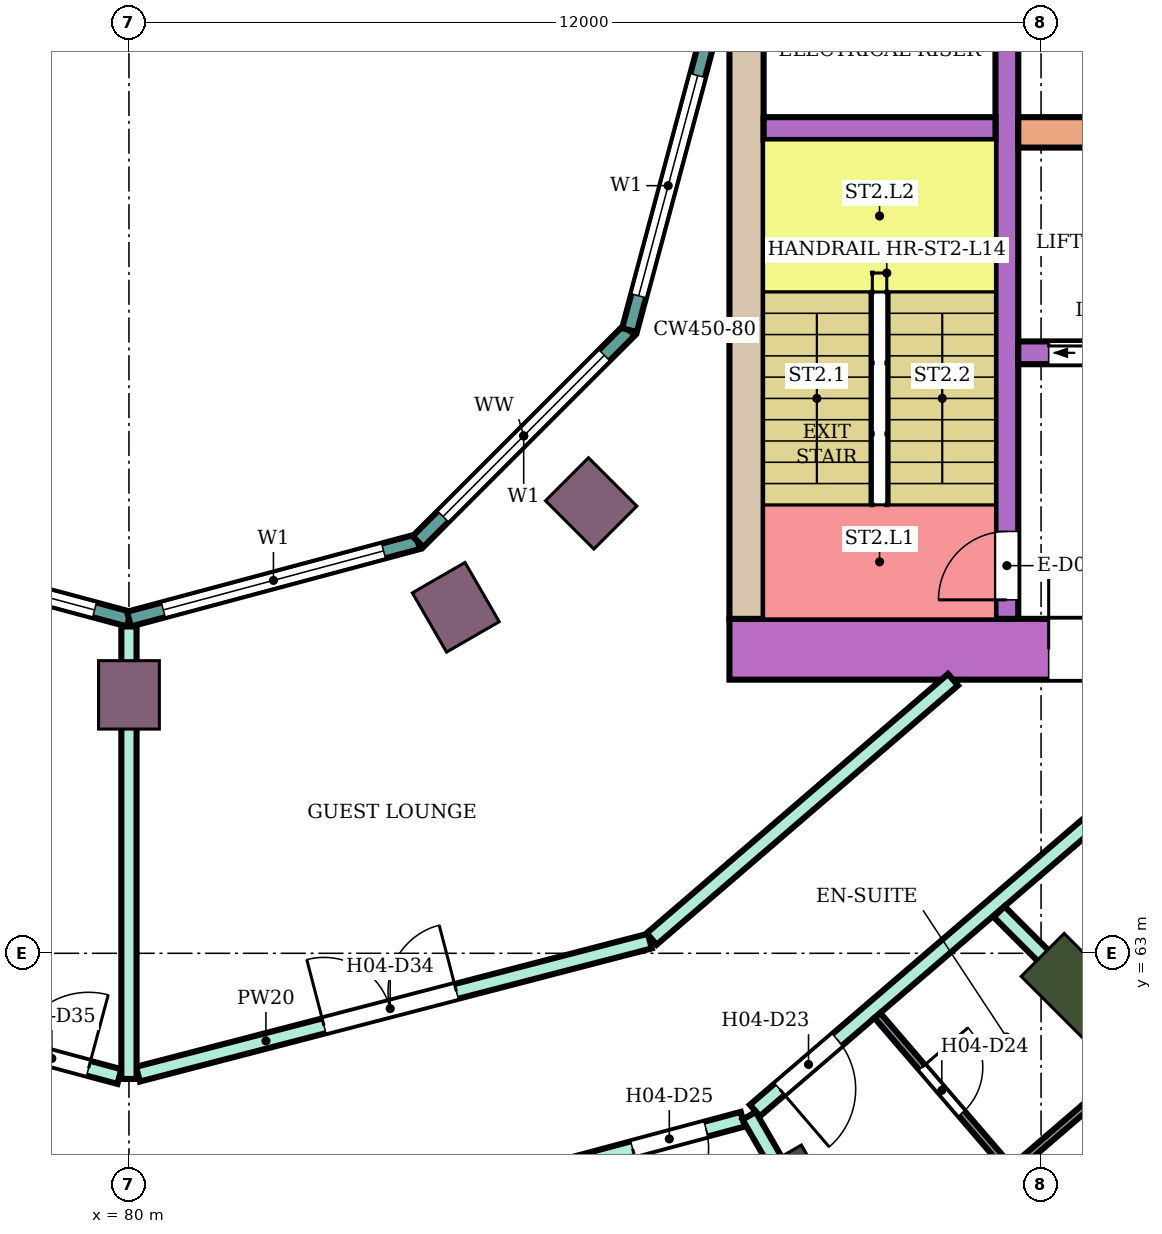
"""IFC4 building model, lengths in metres.
Left out: names, types, materials, properties, quantities, classifications, styles, units other than length and angle.
Written with IfcOpenShell. Run it as: python <this file> out.ifc"""

import sys

from ifc_helpers import new_model, si_unit, direction, frame, frame_2d, origin, origin_2d, place, context, subcontext, project, spatial, rectangle, extrude, element, fill, save


model = new_model("IFC4")
c1 = context("Model", 3, precision=1e-05, world=origin(), true_north=direction((0.0, 1.0)))
c2 = subcontext(c1, "Body", "Model", "MODEL_VIEW")
j1 = project(units=[si_unit("LENGTHUNIT", "METRE"), si_unit("PLANEANGLEUNIT", "RADIAN")], contexts=[c1])
p1 = place(None, origin())
s1 = spatial("IfcSite", under=j1, at=p1, CompositionType="ELEMENT")
p2 = place(p1, origin())
s2 = spatial("IfcBuilding", under=s1, at=p2, CompositionType="ELEMENT")
p3 = place(p2, frame((0.0, 0.0, 63.0)))
s3 = spatial("IfcBuildingStorey", under=s2, at=p3, CompositionType="ELEMENT", Elevation=63.0)
for number, where, z_axis, x_axis in (
    (1, (88.8, 59.758, 0.0), (0.0, 0.0, 1.0), (0.5, -0.866, 0.0)),
    (2, (92.445, 62.555, 0.0), (0.0, 0.0, 1.0), (0.707, -0.707, 0.0)),
):
    element("IfcColumn", number, at=place(p3, frame(where, z_axis=z_axis, x_axis=x_axis)), inside=s3, PredefinedType="COLUMN", context=c2, shape_type="SweptSolid", body=[
        extrude(rectangle(XDim=1.2, YDim=0.8, at=origin_2d()), origin(), (0.0, 0.0, 1.0), 3.8),
    ])
for number, where, z_axis, x_axis in (
    (3, (80.0, 66.4, 0.0), (0.0, 0.0, 1.0), (0.0, -1.0, 0.0)),
    (4, (84.3, 67.552, 0.0), (0.0, 0.0, 1.0), (0.5, -0.866, 0.0)),
    (5, (86.081, 68.919, 0.0), (0.0, 0.0, 1.0), (0.707, -0.707, 0.0)),
):
    element("IfcColumn", number, at=place(p3, frame(where, z_axis=z_axis, x_axis=x_axis)), inside=s3, PredefinedType="COLUMN", context=c2, shape_type="SweptSolid", body=[
        extrude(rectangle(XDim=0.9, YDim=0.8, at=origin_2d()), origin(), (0.0, 0.0, 1.0), 3.8),
    ])
p4 = place(p3, frame((87.9, 67.0, 0.0), z_axis=(0.0, 0.0, 1.0), x_axis=(1.0, 0.0, 0.0)))
e6 = element("IfcWall", 6, at=p4, inside=s3, PredefinedType="SHEAR", context=c2, shape_type="SweptSolid", body=[
    extrude(rectangle(XDim=14.7, YDim=0.8, at=frame_2d((7.35, 0.0))), origin(), (0.0, 0.0, 1.0), 3.48),
])
p5 = place(p4, frame((4.2, 0.0, 0.0)))
e7 = element("IfcOpeningElement", 7, at=p5, cuts=e6, PredefinedType="OPENING", context=c2, shape_type="SweptSolid", body=[
    extrude(rectangle(XDim=2.4, YDim=2.4, at=frame_2d((1.2, 1.2))), frame((0.0, 0.41, 0.0), z_axis=(0.0, -1.0, 0.0), x_axis=(1.0, 0.0, 0.0)), (0.0, 0.0, 1.0), 0.82),
])
p6 = place(p3, frame((88.125, 67.4, 0.0), z_axis=(0.0, 0.0, 1.0), x_axis=(0.0, 1.0, 0.0)))
e8 = element("IfcWall", 8, at=p6, inside=s3, PredefinedType="SHEAR", context=c2, shape_type="SweptSolid", body=[
    extrude(rectangle(XDim=7.6, YDim=0.45, at=frame_2d((3.8, 0.0))), origin(), (0.0, 0.0, 1.0), 3.48),
])
p7 = place(p3, frame((91.55, 67.4, 0.0), z_axis=(0.0, 0.0, 1.0), x_axis=(0.0, 1.0, 0.0)))
e9 = element("IfcWall", 9, at=p7, inside=s3, PredefinedType="SHEAR", context=c2, shape_type="SweptSolid", body=[
    extrude(rectangle(XDim=7.6, YDim=0.3, at=frame_2d((3.8, 0.0))), origin(), (0.0, 0.0, 1.0), 3.48),
])
p8 = place(p7, frame((0.25, 0.0, 0.0)))
e10 = element("IfcOpeningElement", 10, at=p8, cuts=e9, PredefinedType="OPENING", context=c2, shape_type="SweptSolid", body=[
    extrude(rectangle(XDim=0.9, YDim=2.1, at=frame_2d((0.45, 1.05))), frame((0.0, 0.16, 0.0), z_axis=(0.0, -1.0, 0.0), x_axis=(1.0, 0.0, 0.0)), (0.0, 0.0, 1.0), 0.32),
])
p9 = place(p3, frame((88.35, 73.85, 0.0), z_axis=(0.0, 0.0, 1.0), x_axis=(1.0, 0.0, 0.0)))
e11 = element("IfcWall", 11, at=p9, inside=s3, PredefinedType="SHEAR", context=c2, shape_type="SweptSolid", body=[
    extrude(rectangle(XDim=3.05, YDim=0.3, at=frame_2d((1.525, 0.0))), origin(), (0.0, 0.0, 1.0), 3.48),
])
p10 = place(p3, frame((91.7, 73.8, 0.0), z_axis=(0.0, 0.0, 1.0), x_axis=(1.0, 0.0, 0.0)))
e12 = element("IfcWall", 12, at=p10, inside=s3, PredefinedType="SHEAR", context=c2, shape_type="SweptSolid", body=[
    extrude(rectangle(XDim=10.9, YDim=0.4, at=frame_2d((5.45, 0.0))), origin(), (0.0, 0.0, 1.0), 3.48),
])
p11 = place(p3, frame((91.7, 70.9, 0.0), z_axis=(0.0, 0.0, 1.0), x_axis=(1.0, 0.0, 0.0)))
e13 = element("IfcWall", 13, at=p11, inside=s3, PredefinedType="SHEAR", context=c2, shape_type="SweptSolid", body=[
    extrude(rectangle(XDim=10.9, YDim=0.3, at=frame_2d((5.45, 0.0))), origin(), (0.0, 0.0, 1.0), 3.48),
])
p12 = place(p11, frame((0.4, 0.0, 0.0)))
e14 = element("IfcOpeningElement", 14, at=p12, cuts=e13, PredefinedType="OPENING", context=c2, shape_type="SweptSolid", body=[
    extrude(rectangle(XDim=1.4, YDim=2.1, at=frame_2d((0.7, 1.05))), frame((0.0, 0.16, 0.0), z_axis=(0.0, -1.0, 0.0), x_axis=(1.0, 0.0, 0.0)), (0.0, 0.0, 1.0), 0.32),
])
p13 = place(p11, frame((5.4, 0.0, 0.0)))
e15 = element("IfcOpeningElement", 15, at=p13, cuts=e13, PredefinedType="OPENING", context=c2, shape_type="SweptSolid", body=[
    extrude(rectangle(XDim=1.4, YDim=2.1, at=frame_2d((0.7, 1.05))), frame((0.0, 0.16, 0.0), z_axis=(0.0, -1.0, 0.0), x_axis=(1.0, 0.0, 0.0)), (0.0, 0.0, 1.0), 0.32),
])
p14 = place(p11, frame((8.1, 0.0, 0.0)))
e16 = element("IfcOpeningElement", 16, at=p14, cuts=e13, PredefinedType="OPENING", context=c2, shape_type="SweptSolid", body=[
    extrude(rectangle(XDim=1.0, YDim=2.1, at=frame_2d((0.5, 1.05))), frame((0.0, 0.16, 0.0), z_axis=(0.0, -1.0, 0.0), x_axis=(1.0, 0.0, 0.0)), (0.0, 0.0, 1.0), 0.32),
])
p15 = place(p3, frame((76.198, 68.415, 0.0), z_axis=(0.0, 0.0, 1.0), x_axis=(0.965933654434, -0.258789828301, 0.0)))
e17 = element("IfcWall", 17, at=p15, inside=s3, PredefinedType="NOTDEFINED", context=c2, shape_type="SweptSolid", body=[
    extrude(rectangle(XDim=3.936, YDim=0.2, at=frame_2d((1.968, 0.0))), origin(), (0.0, 0.0, 1.0), 3.8),
])
p16 = place(p15, frame((0.468, 0.0, 0.9)))
e18 = element("IfcOpeningElement", 18, at=p16, cuts=e17, PredefinedType="OPENING", context=c2, shape_type="SweptSolid", body=[
    extrude(rectangle(XDim=3.0, YDim=2.3, at=frame_2d((1.5, 1.15))), frame((0.0, 0.11, 0.0), z_axis=(0.0, -1.0, 0.0), x_axis=(1.0, 0.0, 0.0)), (0.0, 0.0, 1.0), 0.22),
])
p17 = place(p3, frame((80.0, 67.396, 0.0), z_axis=(0.0, 0.0, 1.0), x_axis=(0.965933654434, 0.258789828301, 0.0)))
e19 = element("IfcWall", 19, at=p17, inside=s3, PredefinedType="NOTDEFINED", context=c2, shape_type="SweptSolid", body=[
    extrude(rectangle(XDim=3.936, YDim=0.2, at=frame_2d((1.968, 0.0))), origin(), (0.0, 0.0, 1.0), 3.8),
])
p18 = place(p17, frame((0.468, 0.0, 0.9)))
e20 = element("IfcOpeningElement", 20, at=p18, cuts=e19, PredefinedType="OPENING", context=c2, shape_type="SweptSolid", body=[
    extrude(rectangle(XDim=3.0, YDim=2.3, at=frame_2d((1.5, 1.15))), frame((0.0, 0.11, 0.0), z_axis=(0.0, -1.0, 0.0), x_axis=(1.0, 0.0, 0.0)), (0.0, 0.0, 1.0), 0.22),
])
p19 = place(p3, frame((83.802, 68.415, 0.0), z_axis=(0.0, 0.0, 1.0), x_axis=(0.707106781187, 0.707106781187, 0.0)))
e21 = element("IfcWall", 21, at=p19, inside=s3, PredefinedType="NOTDEFINED", context=c2, shape_type="SweptSolid", body=[
    extrude(rectangle(XDim=3.936, YDim=0.2, at=frame_2d((1.968, 0.0))), origin(), (0.0, 0.0, 1.0), 3.8),
])
p20 = place(p19, frame((0.468, 0.0, 0.9)))
e22 = element("IfcOpeningElement", 22, at=p20, cuts=e21, PredefinedType="OPENING", context=c2, shape_type="SweptSolid", body=[
    extrude(rectangle(XDim=3.0, YDim=2.3, at=frame_2d((1.5, 1.15))), frame((0.0, 0.11, 0.0), z_axis=(0.0, -1.0, 0.0), x_axis=(1.0, 0.0, 0.0)), (0.0, 0.0, 1.0), 0.22),
])
p21 = place(p3, frame((86.585, 71.198, 0.0), z_axis=(0.0, 0.0, 1.0), x_axis=(0.258789828301, 0.965933654434, 0.0)))
e23 = element("IfcWall", 23, at=p21, inside=s3, PredefinedType="NOTDEFINED", context=c2, shape_type="SweptSolid", body=[
    extrude(rectangle(XDim=3.936, YDim=0.2, at=frame_2d((1.968, 0.0))), origin(), (0.0, 0.0, 1.0), 3.8),
])
p22 = place(p21, frame((0.468, 0.0, 0.9)))
e24 = element("IfcOpeningElement", 24, at=p22, cuts=e23, PredefinedType="OPENING", context=c2, shape_type="SweptSolid", body=[
    extrude(rectangle(XDim=3.0, YDim=2.3, at=frame_2d((1.5, 1.15))), frame((0.0, 0.11, 0.0), z_axis=(0.0, -1.0, 0.0), x_axis=(1.0, 0.0, 0.0)), (0.0, 0.0, 1.0), 0.22),
])
p23 = place(p3, frame((71.877, 60.832, 0.0), z_axis=(0.0, 0.0, 1.0), x_axis=(0.965852509869, -0.259092510851, 0.0)))
e25 = element("IfcWall", 25, at=p23, inside=s3, PredefinedType="PARTITIONING", context=c2, shape_type="SweptSolid", body=[
    extrude(rectangle(XDim=8.32, YDim=0.2, at=frame_2d((4.16, 0.0))), origin(), (0.0, 0.0, 1.0), 3.35),
])
p24 = place(p23, frame((6.86, 0.0, 0.0)))
e26 = element("IfcOpeningElement", 26, at=p24, cuts=e25, PredefinedType="OPENING", context=c2, shape_type="SweptSolid", body=[
    extrude(rectangle(XDim=1.0, YDim=2.1, at=frame_2d((0.5, 1.05))), frame((0.0, 0.11, 0.0), z_axis=(0.0, -1.0, 0.0), x_axis=(1.0, 0.0, 0.0)), (0.0, 0.0, 1.0), 0.22),
])
p25 = place(p23, frame((0.55, 0.0, 0.0)))
e27 = element("IfcOpeningElement", 27, at=p25, cuts=e25, PredefinedType="OPENING", context=c2, shape_type="SweptSolid", body=[
    extrude(rectangle(XDim=1.0, YDim=2.1, at=frame_2d((0.5, 1.05))), frame((0.0, 0.11, 0.0), z_axis=(0.0, -1.0, 0.0), x_axis=(1.0, 0.0, 0.0)), (0.0, 0.0, 1.0), 0.22),
])
p26 = place(p3, frame((73.297, 63.143, 0.0), z_axis=(0.0, 0.0, 1.0), x_axis=(0.965859030528, -0.25906820173, 0.0)))
e28 = element("IfcWall", 28, at=p26, inside=s3, PredefinedType="PARTITIONING", context=c2, shape_type="SweptSolid", body=[
    extrude(rectangle(XDim=6.81, YDim=0.2, at=frame_2d((3.405, 0.0))), origin(), (0.0, 0.0, 1.0), 3.35),
])
p27 = place(p26, frame((5.39, 0.0, 0.0)))
e29 = element("IfcOpeningElement", 29, at=p27, cuts=e28, PredefinedType="OPENING", context=c2, shape_type="SweptSolid", body=[
    extrude(rectangle(XDim=1.0, YDim=2.1, at=frame_2d((0.5, 1.05))), frame((0.0, 0.11, 0.0), z_axis=(0.0, -1.0, 0.0), x_axis=(1.0, 0.0, 0.0)), (0.0, 0.0, 1.0), 0.22),
])
p28 = place(p3, frame((80.119, 61.41, 0.0), z_axis=(0.0, 0.0, 1.0), x_axis=(0.967823361235, 0.251630565408, 0.0)))
e30 = element("IfcWall", 30, at=p28, inside=s3, PredefinedType="PARTITIONING", context=c2, shape_type="SweptSolid", body=[
    extrude(rectangle(XDim=6.958, YDim=0.2, at=frame_2d((3.479, 0.0))), origin(), (0.0, 0.0, 1.0), 3.35),
])
p29 = place(p28, frame((2.529, 0.0, 0.0)))
e31 = element("IfcOpeningElement", 31, at=p29, cuts=e30, PredefinedType="OPENING", context=c2, shape_type="SweptSolid", body=[
    extrude(rectangle(XDim=1.8, YDim=2.1, at=frame_2d((0.9, 1.05))), frame((0.0, 0.11, 0.0), z_axis=(0.0, -1.0, 0.0), x_axis=(1.0, 0.0, 0.0)), (0.0, 0.0, 1.0), 0.22),
])
p30 = place(p3, frame((80.0, 58.655, 0.0), z_axis=(0.0, 0.0, 1.0), x_axis=(0.965974635626, 0.258636817424, 0.0)))
e32 = element("IfcWall", 32, at=p30, inside=s3, PredefinedType="PARTITIONING", context=c2, shape_type="SweptSolid", body=[
    extrude(rectangle(XDim=8.36, YDim=0.2, at=frame_2d((4.18, 0.0))), origin(), (0.0, 0.0, 1.0), 3.35),
])
p31 = place(p30, frame((6.86, 0.0, 0.0)))
e33 = element("IfcOpeningElement", 33, at=p31, cuts=e32, PredefinedType="OPENING", context=c2, shape_type="SweptSolid", body=[
    extrude(rectangle(XDim=1.0, YDim=2.1, at=frame_2d((0.5, 1.05))), frame((0.0, 0.11, 0.0), z_axis=(0.0, -1.0, 0.0), x_axis=(1.0, 0.0, 0.0)), (0.0, 0.0, 1.0), 0.22),
])
p32 = place(p30, frame((0.55, 0.0, 0.0)))
e34 = element("IfcOpeningElement", 34, at=p32, cuts=e32, PredefinedType="OPENING", context=c2, shape_type="SweptSolid", body=[
    extrude(rectangle(XDim=1.0, YDim=2.1, at=frame_2d((0.5, 1.05))), frame((0.0, 0.11, 0.0), z_axis=(0.0, -1.0, 0.0), x_axis=(1.0, 0.0, 0.0)), (0.0, 0.0, 1.0), 0.22),
])
p33 = place(p3, frame((80.0, 61.347, 0.0), z_axis=(0.0, 0.0, 1.0), x_axis=(0.0, 1.0, 0.0)))
e35 = element("IfcWall", 35, at=p33, inside=s3, PredefinedType="PARTITIONING", context=c2, shape_type="SweptSolid", body=[
    extrude(rectangle(XDim=5.953, YDim=0.2, at=frame_2d((2.977, 0.0))), origin(), (0.0, 0.0, 1.0), 3.35),
])
p34 = place(p3, frame((86.877, 63.189, 0.0), z_axis=(0.0, 0.0, 1.0), x_axis=(0.758088707506, 0.652151448325, 0.0)))
e36 = element("IfcWall", 36, at=p34, inside=s3, PredefinedType="PARTITIONING", context=c2, shape_type="SweptSolid", body=[
    extrude(rectangle(XDim=5.229, YDim=0.2, at=frame_2d((2.615, 0.0))), origin(), (0.0, 0.0, 1.0), 3.35),
])
p35 = place(p3, frame((88.235, 60.931, 0.0), z_axis=(0.0, 0.0, 1.0), x_axis=(0.758799498714, 0.651324282329, 0.0)))
e37 = element("IfcWall", 37, at=p35, inside=s3, PredefinedType="PARTITIONING", context=c2, shape_type="SweptSolid", body=[
    extrude(rectangle(XDim=6.186, YDim=0.2, at=frame_2d((3.093, 0.0))), origin(), (0.0, 0.0, 1.0), 3.35),
])
p36 = place(p35, frame((0.43, 0.0, 0.0)))
e38 = element("IfcOpeningElement", 38, at=p36, cuts=e37, PredefinedType="OPENING", context=c2, shape_type="SweptSolid", body=[
    extrude(rectangle(XDim=1.0, YDim=2.1, at=frame_2d((0.5, 1.05))), frame((0.0, 0.11, 0.0), z_axis=(0.0, -1.0, 0.0), x_axis=(1.0, 0.0, 0.0)), (0.0, 0.0, 1.0), 0.22),
])
p37 = place(p3, frame((88.159, 60.863, 0.0), z_axis=(0.0, 0.0, 1.0), x_axis=(0.499935840196, -0.866062443296, 0.0)))
e39 = element("IfcWall", 39, at=p37, inside=s3, PredefinedType="PARTITIONING", context=c2, shape_type="SweptSolid", body=[
    extrude(rectangle(XDim=9.475, YDim=0.2, at=frame_2d((4.737, 0.0))), origin(), (0.0, 0.0, 1.0), 3.35),
])
p38 = place(p3, frame((91.448, 63.547, 0.0), z_axis=(0.0, 0.0, 1.0), x_axis=(0.706984810649, -0.707228730688, 0.0)))
e40 = element("IfcWall", 40, at=p38, inside=s3, PredefinedType="PARTITIONING", context=c2, shape_type="SweptSolid", body=[
    extrude(rectangle(XDim=7.006, YDim=0.2, at=frame_2d((3.503, 0.0))), origin(), (0.0, 0.0, 1.0), 3.35),
])
p39 = place(p3, frame((89.846, 62.182, 0.0), z_axis=(0.0, 0.0, 1.0), x_axis=(0.652095405055, -0.758136915541, 0.0)))
e41 = element("IfcWall", 41, at=p39, inside=s3, PredefinedType="PARTITIONING", context=c2, shape_type="SweptSolid", body=[
    extrude(rectangle(XDim=2.65, YDim=0.1, at=frame_2d((1.325, 0.0))), origin(), (0.0, 0.0, 1.0), 3.35),
])
p40 = place(p39, frame((0.9, 0.0, 0.0)))
e42 = element("IfcOpeningElement", 42, at=p40, cuts=e41, PredefinedType="OPENING", context=c2, shape_type="SweptSolid", body=[
    extrude(rectangle(XDim=0.8, YDim=2.1, at=frame_2d((0.4, 1.05))), frame((0.0, 0.06, 0.0), z_axis=(0.0, -1.0, 0.0), x_axis=(1.0, 0.0, 0.0)), (0.0, 0.0, 1.0), 0.12),
])
p41 = place(p3, frame((91.607, 60.135, 0.0), z_axis=(0.0, 0.0, 1.0), x_axis=(0.758121792225, 0.65211298726, 0.0)))
e43 = element("IfcWall", 43, at=p41, inside=s3, PredefinedType="PARTITIONING", context=c2, shape_type="SweptSolid", body=[
    extrude(rectangle(XDim=4.15, YDim=0.1, at=frame_2d((2.075, 0.0))), origin(), (0.0, 0.0, 1.0), 3.35),
])
p42 = place(p16, origin())
e44 = element("IfcWindow", 44, at=p42, inside=s3, PartitioningType="SINGLE_PANEL", PredefinedType="WINDOW", context=c2, shape_type="SweptSolid", body=[
    extrude(rectangle(XDim=3.0, YDim=2.3, at=frame_2d((1.5, 1.15))), frame((0.0, 0.03, 0.0), z_axis=(0.0, -1.0, 0.0), x_axis=(1.0, 0.0, 0.0)), (0.0, 0.0, 1.0), 0.06),
])
fill(e18, e44)
p43 = place(p18, origin())
e45 = element("IfcWindow", 45, at=p43, inside=s3, PartitioningType="SINGLE_PANEL", PredefinedType="WINDOW", context=c2, shape_type="SweptSolid", body=[
    extrude(rectangle(XDim=3.0, YDim=2.3, at=frame_2d((1.5, 1.15))), frame((0.0, 0.03, 0.0), z_axis=(0.0, -1.0, 0.0), x_axis=(1.0, 0.0, 0.0)), (0.0, 0.0, 1.0), 0.06),
])
fill(e20, e45)
p44 = place(p20, origin())
e46 = element("IfcWindow", 46, at=p44, inside=s3, PartitioningType="SINGLE_PANEL", PredefinedType="WINDOW", context=c2, shape_type="SweptSolid", body=[
    extrude(rectangle(XDim=3.0, YDim=2.3, at=frame_2d((1.5, 1.15))), frame((0.0, 0.03, 0.0), z_axis=(0.0, -1.0, 0.0), x_axis=(1.0, 0.0, 0.0)), (0.0, 0.0, 1.0), 0.06),
])
fill(e22, e46)
p45 = place(p22, origin())
e47 = element("IfcWindow", 47, at=p45, inside=s3, PartitioningType="SINGLE_PANEL", PredefinedType="WINDOW", context=c2, shape_type="SweptSolid", body=[
    extrude(rectangle(XDim=3.0, YDim=2.3, at=frame_2d((1.5, 1.15))), frame((0.0, 0.03, 0.0), z_axis=(0.0, -1.0, 0.0), x_axis=(1.0, 0.0, 0.0)), (0.0, 0.0, 1.0), 0.06),
])
fill(e24, e47)
p46 = place(p36, frame((1.0, 0.0, 0.0), z_axis=(0.0, 0.0, 1.0), x_axis=(-1.0, 0.0, 0.0)))
e48 = element("IfcDoor", 48, at=p46, inside=s3, OperationType="SINGLE_SWING_RIGHT", PredefinedType="DOOR", context=c2, shape_type="SweptSolid", body=[
    extrude(rectangle(XDim=1.0, YDim=2.1, at=frame_2d((0.5, 1.05))), frame((0.0, 0.025, 0.0), z_axis=(0.0, -1.0, 0.0), x_axis=(1.0, 0.0, 0.0)), (0.0, 0.0, 1.0), 0.05),
])
fill(e38, e48)
p47 = place(p40, origin())
e49 = element("IfcDoor", 49, at=p47, inside=s3, OperationType="SINGLE_SWING_LEFT", PredefinedType="DOOR", context=c2, shape_type="SweptSolid", body=[
    extrude(rectangle(XDim=0.8, YDim=2.1, at=frame_2d((0.4, 1.05))), frame((0.0, 0.025, 0.0), z_axis=(0.0, -1.0, 0.0), x_axis=(1.0, 0.0, 0.0)), (0.0, 0.0, 1.0), 0.05),
])
fill(e42, e49)
p48 = place(p31, frame((1.0, 0.0, 0.0), z_axis=(0.0, 0.0, 1.0), x_axis=(-1.0, 0.0, 0.0)))
e50 = element("IfcDoor", 50, at=p48, inside=s3, OperationType="SINGLE_SWING_RIGHT", PredefinedType="DOOR", context=c2, shape_type="SweptSolid", body=[
    extrude(rectangle(XDim=1.0, YDim=2.1, at=frame_2d((0.5, 1.05))), frame((0.0, 0.025, 0.0), z_axis=(0.0, -1.0, 0.0), x_axis=(1.0, 0.0, 0.0)), (0.0, 0.0, 1.0), 0.05),
])
fill(e33, e50)
p49 = place(p29, origin())
e51 = element("IfcDoor", 51, at=p49, inside=s3, OperationType="DOUBLE_DOOR_SINGLE_SWING", PredefinedType="DOOR", context=c2, shape_type="SweptSolid", body=[
    extrude(rectangle(XDim=1.8, YDim=2.1, at=frame_2d((0.9, 1.05))), frame((0.0, 0.025, 0.0), z_axis=(0.0, -1.0, 0.0), x_axis=(1.0, 0.0, 0.0)), (0.0, 0.0, 1.0), 0.05),
])
fill(e31, e51)
p50 = place(p27, origin())
e52 = element("IfcDoor", 52, at=p50, inside=s3, OperationType="SINGLE_SWING_RIGHT", PredefinedType="DOOR", context=c2, shape_type="SweptSolid", body=[
    extrude(rectangle(XDim=1.0, YDim=2.1, at=frame_2d((0.5, 1.05))), frame((0.0, 0.025, 0.0), z_axis=(0.0, -1.0, 0.0), x_axis=(1.0, 0.0, 0.0)), (0.0, 0.0, 1.0), 0.05),
])
fill(e29, e52)
p51 = place(p8, origin())
e53 = element("IfcDoor", 53, at=p51, inside=s3, OperationType="SINGLE_SWING_LEFT", PredefinedType="DOOR", context=c2, shape_type="SweptSolid", body=[
    extrude(rectangle(XDim=0.9, YDim=2.1, at=frame_2d((0.45, 1.05))), frame((0.0, 0.025, 0.0), z_axis=(0.0, -1.0, 0.0), x_axis=(1.0, 0.0, 0.0)), (0.0, 0.0, 1.0), 0.05),
])
fill(e10, e53)
p52 = place(p12, origin())
e54 = element("IfcDoor", 54, at=p52, inside=s3, OperationType="DOUBLE_DOOR_SLIDING", PredefinedType="DOOR", context=c2, shape_type="SweptSolid", body=[
    extrude(rectangle(XDim=1.4, YDim=2.1, at=frame_2d((0.7, 1.05))), frame((0.0, 0.025, 0.0), z_axis=(0.0, -1.0, 0.0), x_axis=(1.0, 0.0, 0.0)), (0.0, 0.0, 1.0), 0.05),
])
fill(e14, e54)
p53 = place(p5, origin())
e55 = element("IfcDoor", 55, at=p53, inside=s3, OperationType="DOUBLE_DOOR_SINGLE_SWING", PredefinedType="DOOR", context=c2, shape_type="SweptSolid", body=[
    extrude(rectangle(XDim=2.4, YDim=2.4, at=frame_2d((1.2, 1.2))), frame((0.0, 0.025, 0.0), z_axis=(0.0, -1.0, 0.0), x_axis=(1.0, 0.0, 0.0)), (0.0, 0.0, 1.0), 0.05),
])
fill(e7, e55)
save(model, sys.argv[1])
